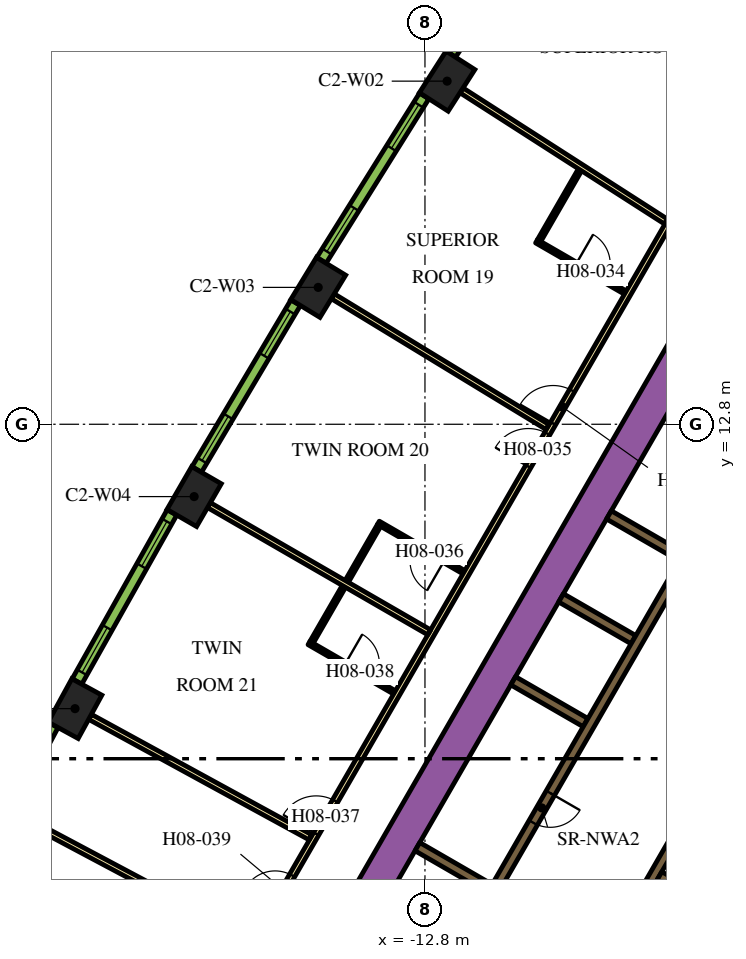
"""IFC4 building model, lengths in metres.
Left out: names, types, materials, properties, quantities, classifications, styles, units other than length and angle.
Written with IfcOpenShell. Run it as: python <this file> out.ifc"""

import sys

from ifc_helpers import new_model, si_unit, direction, frame, frame_2d, origin, origin_2d, place, context, subcontext, project, spatial, rectangle, extrude, element, fill, save


model = new_model("IFC4")
c1 = context("Model", 3, precision=1e-05, world=origin(), true_north=direction((0.0, 1.0)))
c2 = subcontext(c1, "Body", "Model", "MODEL_VIEW")
j1 = project(units=[si_unit("LENGTHUNIT", "METRE"), si_unit("PLANEANGLEUNIT", "RADIAN")], contexts=[c1])
p1 = place(None, origin())
s1 = spatial("IfcSite", under=j1, at=p1, CompositionType="ELEMENT")
p2 = place(p1, origin())
s2 = spatial("IfcBuilding", under=s1, at=p2, CompositionType="ELEMENT")
p3 = place(p2, frame((0.0, 0.0, 107.1)))
s3 = spatial("IfcBuildingStorey", under=s2, at=p3, CompositionType="ELEMENT", Elevation=107.1)
for number, where, z_axis, x_axis in (
    (1, (-12.217, 21.828, 0.0), (0.0, 0.0, 1.0), (-0.54, -0.842, 0.0)),
    (2, (-15.609, 16.402, 0.0), (0.0, 0.0, 1.0), (-0.52, -0.854, 0.0)),
    (3, (-18.874, 10.897, 0.0), (0.0, 0.0, 1.0), (-0.5, -0.866, 0.0)),
    (4, (-22.009, 5.317, 0.0), (0.0, 0.0, 1.0), (-0.48, -0.877, 0.0)),
):
    element("IfcColumn", number, at=place(p3, frame(where, z_axis=z_axis, x_axis=x_axis)), inside=s3, PredefinedType="COLUMN", context=c2, shape_type="SweptSolid", body=[
        extrude(rectangle(XDim=1.3, YDim=0.9, at=origin_2d()), origin(), (0.0, 0.0, 1.0), 3.9),
    ])
p4 = place(p3, frame((-15.36, -1.503, 0.0), z_axis=(0.0, 0.0, 1.0), x_axis=(0.50000389221, 0.866023156604, 0.0)))
e5 = element("IfcWall", 5, at=p4, inside=s3, PredefinedType="SOLIDWALL", context=c2, shape_type="SweptSolid", body=[
    extrude(rectangle(XDim=21.0, YDim=0.9, at=frame_2d((10.5, 0.0))), origin(), (0.0, 0.0, 1.0), 3.9),
])
p5 = place(p3, frame((-8.06, -1.311, 0.0), z_axis=(0.0, 0.0, 1.0), x_axis=(0.50000273126, 0.866023826885, 0.0)))
e6 = element("IfcWall", 6, at=p5, inside=s3, PredefinedType="SOLIDWALL", context=c2, shape_type="SweptSolid", body=[
    extrude(rectangle(XDim=10.33, YDim=0.25, at=frame_2d((5.165, 0.0))), origin(), (0.0, 0.0, 1.0), 3.9),
])
p6 = place(p3, frame((-4.724, -0.182, 0.0), z_axis=(0.0, 0.0, 1.0), x_axis=(-0.866008176907, 0.50002983664, 0.0)))
e7 = element("IfcWall", 7, at=p6, inside=s3, PredefinedType="SOLIDWALL", context=c2, shape_type="SweptSolid", body=[
    extrude(rectangle(XDim=2.2, YDim=0.25, at=frame_2d((1.1, 0.0))), origin(), (0.0, 0.0, 1.0), 3.9),
])
p7 = place(p3, frame((-8.106, -1.14, 0.0), z_axis=(0.0, 0.0, 1.0), x_axis=(-0.866000643155, 0.500042884217, 0.0)))
e8 = element("IfcWall", 8, at=p7, inside=s3, PredefinedType="SOLIDWALL", context=c2, shape_type="SweptSolid", body=[
    extrude(rectangle(XDim=5.65, YDim=0.25, at=frame_2d((2.825, 0.0))), origin(), (0.0, 0.0, 1.0), 3.9),
])
for number, where, z_axis, x_axis in (
    (9, (-8.574, 4.95, 0.0), (0.0, 0.0, 1.0), (-0.866, 0.5, 0.0)),
    (10, (-7.314, 7.132, 0.0), (0.0, 0.0, 1.0), (-0.866, 0.5, 0.0)),
):
    element("IfcWall", number, at=place(p3, frame(where, z_axis=z_axis, x_axis=x_axis)), inside=s3, PredefinedType="SOLIDWALL", context=c2, shape_type="SweptSolid", body=[
        extrude(rectangle(XDim=2.2, YDim=0.25, at=frame_2d((1.1, 0.0))), origin(), (0.0, 0.0, 1.0), 3.9),
    ])
p8 = place(p3, frame((-7.959, 10.415, 0.0), z_axis=(0.0, 0.0, 1.0), x_axis=(0.866020958405, -0.500007699544, 0.0)))
e11 = element("IfcWall", 11, at=p8, inside=s3, PredefinedType="SOLIDWALL", context=c2, shape_type="SweptSolid", body=[
    extrude(rectangle(XDim=4.1, YDim=0.25, at=frame_2d((2.05, 0.0))), origin(), (0.0, 0.0, 1.0), 3.9),
])
p9 = place(p3, frame((-6.008, 9.144, 0.0), z_axis=(0.0, 0.0, 1.0), x_axis=(-0.500006956611, -0.866021387346, 0.0)))
e12 = element("IfcWall", 12, at=p9, inside=s3, PredefinedType="SOLIDWALL", context=c2, shape_type="SweptSolid", body=[
    extrude(rectangle(XDim=9.83, YDim=0.25, at=frame_2d((4.915, 0.0))), origin(), (0.0, 0.0, 1.0), 3.9),
])
p10 = place(p9, frame((6.985, 0.0, 0.0)))
e13 = element("IfcOpeningElement", 13, at=p10, cuts=e12, PredefinedType="OPENING", context=c2, shape_type="SweptSolid", body=[
    extrude(rectangle(XDim=0.9, YDim=2.1, at=frame_2d((0.45, 1.05))), frame((0.0, 0.135, 0.0), z_axis=(0.0, -1.0, 0.0), x_axis=(1.0, 0.0, 0.0)), (0.0, 0.0, 1.0), 0.27),
])
p11 = place(p3, frame((-19.081, -3.9, 0.0), z_axis=(0.0, 0.0, 1.0), x_axis=(0.499998313975, 0.866026377209, 0.0)))
e14 = element("IfcWall", 14, at=p11, inside=s3, PredefinedType="PARTITIONING", context=c2, shape_type="SweptSolid", body=[
    extrude(rectangle(XDim=25.766, YDim=0.15, at=frame_2d((12.883, 0.0))), origin(), (0.0, 0.0, 1.0), 2.75),
])
p12 = place(p11, frame((19.306, 0.0, 0.0)))
e15 = element("IfcOpeningElement", 15, at=p12, cuts=e14, PredefinedType="OPENING", context=c2, shape_type="SweptSolid", body=[
    extrude(rectangle(XDim=1.0, YDim=2.1, at=frame_2d((0.5, 1.05))), frame((0.0, 0.085, 0.0), z_axis=(0.0, -1.0, 0.0), x_axis=(1.0, 0.0, 0.0)), (0.0, 0.0, 1.0), 0.17),
])
p13 = place(p11, frame((18.0, 0.0, 0.0)))
e16 = element("IfcOpeningElement", 16, at=p13, cuts=e14, PredefinedType="OPENING", context=c2, shape_type="SweptSolid", body=[
    extrude(rectangle(XDim=1.0, YDim=2.1, at=frame_2d((0.5, 1.05))), frame((0.0, 0.085, 0.0), z_axis=(0.0, -1.0, 0.0), x_axis=(1.0, 0.0, 0.0)), (0.0, 0.0, 1.0), 0.17),
])
p14 = place(p11, frame((6.838, 0.0, 0.0)))
e17 = element("IfcOpeningElement", 17, at=p14, cuts=e14, PredefinedType="OPENING", context=c2, shape_type="SweptSolid", body=[
    extrude(rectangle(XDim=1.0, YDim=2.1, at=frame_2d((0.5, 1.05))), frame((0.0, 0.085, 0.0), z_axis=(0.0, -1.0, 0.0), x_axis=(1.0, 0.0, 0.0)), (0.0, 0.0, 1.0), 0.17),
])
p15 = place(p11, frame((4.674, 0.0, 0.0)))
e18 = element("IfcOpeningElement", 18, at=p15, cuts=e14, PredefinedType="OPENING", context=c2, shape_type="SweptSolid", body=[
    extrude(rectangle(XDim=0.9, YDim=2.1, at=frame_2d((0.45, 1.05))), frame((0.0, 0.085, 0.0), z_axis=(0.0, -1.0, 0.0), x_axis=(1.0, 0.0, 0.0)), (0.0, 0.0, 1.0), 0.17),
])
p16 = place(p11, frame((0.18, 0.0, 0.0)))
e19 = element("IfcOpeningElement", 19, at=p16, cuts=e14, PredefinedType="OPENING", context=c2, shape_type="SweptSolid", body=[
    extrude(rectangle(XDim=1.0, YDim=2.1, at=frame_2d((0.5, 1.05))), frame((0.0, 0.085, 0.0), z_axis=(0.0, -1.0, 0.0), x_axis=(1.0, 0.0, 0.0)), (0.0, 0.0, 1.0), 0.17),
])
p17 = place(p3, frame((-23.652, 2.567, 0.0), z_axis=(0.0, 0.0, 1.0), x_axis=(0.883019237957, -0.469336793144, 0.0)))
e20 = element("IfcWall", 20, at=p17, inside=s3, PredefinedType="PARTITIONING", context=c2, shape_type="SweptSolid", body=[
    extrude(rectangle(XDim=7.111, YDim=0.15, at=frame_2d((3.555, 0.0))), origin(), (0.0, 0.0, 1.0), 2.75),
])
p18 = place(p3, frame((-21.614, 5.102, 0.0), z_axis=(0.0, 0.0, 1.0), x_axis=(0.877484555087, -0.479604895287, 0.0)))
e21 = element("IfcWall", 21, at=p18, inside=s3, PredefinedType="PARTITIONING", context=c2, shape_type="SweptSolid", body=[
    extrude(rectangle(XDim=6.611, YDim=0.15, at=frame_2d((3.306, 0.0))), origin(), (0.0, 0.0, 1.0), 2.75),
])
p19 = place(p3, frame((-18.484, 10.672, 0.0), z_axis=(0.0, 0.0, 1.0), x_axis=(0.866019162053, -0.50001081084, 0.0)))
e22 = element("IfcWall", 22, at=p19, inside=s3, PredefinedType="PARTITIONING", context=c2, shape_type="SweptSolid", body=[
    extrude(rectangle(XDim=6.694, YDim=0.15, at=frame_2d((3.347, 0.0))), origin(), (0.0, 0.0, 1.0), 2.75),
])
p20 = place(p3, frame((-15.225, 16.167, 0.0), z_axis=(0.0, 0.0, 1.0), x_axis=(0.854088713274, -0.520127359266, 0.0)))
e23 = element("IfcWall", 23, at=p20, inside=s3, PredefinedType="PARTITIONING", context=c2, shape_type="SweptSolid", body=[
    extrude(rectangle(XDim=6.611, YDim=0.15, at=frame_2d((3.305, 0.0))), origin(), (0.0, 0.0, 1.0), 2.75),
])
p21 = place(p3, frame((-11.838, 21.585, 0.0), z_axis=(0.0, 0.0, 1.0), x_axis=(0.841699322813, -0.539946525108, 0.0)))
e24 = element("IfcWall", 24, at=p21, inside=s3, PredefinedType="PARTITIONING", context=c2, shape_type="SweptSolid", body=[
    extrude(rectangle(XDim=6.392, YDim=0.15, at=frame_2d((3.196, 0.0))), origin(), (0.0, 0.0, 1.0), 2.75),
])
p22 = place(p3, frame((-8.326, 26.923, 0.0), z_axis=(0.0, 0.0, 1.0), x_axis=(0.828836601893, -0.5594907393, 0.0)))
e25 = element("IfcWall", 25, at=p22, inside=s3, PredefinedType="PARTITIONING", context=c2, shape_type="SweptSolid", body=[
    extrude(rectangle(XDim=8.909, YDim=0.15, at=frame_2d((4.455, 0.0))), origin(), (0.0, 0.0, 1.0), 2.75),
])
p23 = place(p3, frame((-9.864, 17.615, 0.0), z_axis=(0.0, 0.0, 1.0), x_axis=(0.866019956843, -0.50000943426, 0.0)))
e26 = element("IfcWall", 26, at=p23, inside=s3, PredefinedType="PARTITIONING", context=c2, shape_type="SweptSolid", body=[
    extrude(rectangle(XDim=2.7, YDim=0.1, at=frame_2d((1.35, 0.0))), origin(), (0.0, 0.0, 1.0), 2.75),
])
p24 = place(p23, frame((1.2, 0.0, 0.0)))
e27 = element("IfcOpeningElement", 27, at=p24, cuts=e26, PredefinedType="OPENING", context=c2, shape_type="SweptSolid", body=[
    extrude(rectangle(XDim=0.9, YDim=2.1, at=frame_2d((0.45, 1.05))), frame((0.0, 0.06, 0.0), z_axis=(0.0, -1.0, 0.0), x_axis=(1.0, 0.0, 0.0)), (0.0, 0.0, 1.0), 0.12),
])
p25 = place(p3, frame((-9.796, 17.633, 0.0), z_axis=(0.0, 0.0, 1.0), x_axis=(0.499961633463, 0.866047553582, 0.0)))
e28 = element("IfcWall", 28, at=p25, inside=s3, PredefinedType="PARTITIONING", context=c2, shape_type="SweptSolid", body=[
    extrude(rectangle(XDim=2.15, YDim=0.1, at=frame_2d((1.075, 0.0))), origin(), (0.0, 0.0, 1.0), 2.75),
])
p26 = place(p3, frame((-11.774, 8.906, 0.0), z_axis=(0.0, 0.0, 1.0), x_axis=(-0.865997922154, 0.500047596559, 0.0)))
e29 = element("IfcWall", 29, at=p26, inside=s3, PredefinedType="PARTITIONING", context=c2, shape_type="SweptSolid", body=[
    extrude(rectangle(XDim=2.6, YDim=0.1, at=frame_2d((1.3, 0.0))), origin(), (0.0, 0.0, 1.0), 2.75),
])
p27 = place(p26, frame((0.6, 0.0, 0.0)))
e30 = element("IfcOpeningElement", 30, at=p27, cuts=e29, PredefinedType="OPENING", context=c2, shape_type="SweptSolid", body=[
    extrude(rectangle(XDim=0.9, YDim=2.1, at=frame_2d((0.45, 1.05))), frame((0.0, 0.06, 0.0), z_axis=(0.0, -1.0, 0.0), x_axis=(1.0, 0.0, 0.0)), (0.0, 0.0, 1.0), 0.12),
])
p28 = place(p3, frame((-14.008, 10.138, 0.0), z_axis=(0.0, 0.0, 1.0), x_axis=(-0.499892348375, -0.866087547558, 0.0)))
e31 = element("IfcWall", 31, at=p28, inside=s3, PredefinedType="PARTITIONING", context=c2, shape_type="SweptSolid", body=[
    extrude(rectangle(XDim=1.7, YDim=0.1, at=frame_2d((0.85, 0.0))), origin(), (0.0, 0.0, 1.0), 2.75),
])
p29 = place(p3, frame((-15.852, 7.044, 0.0), z_axis=(0.0, 0.0, 1.0), x_axis=(0.866021400173, -0.500006934395, 0.0)))
e32 = element("IfcWall", 32, at=p29, inside=s3, PredefinedType="PARTITIONING", context=c2, shape_type="SweptSolid", body=[
    extrude(rectangle(XDim=2.6, YDim=0.1, at=frame_2d((1.3, 0.0))), origin(), (0.0, 0.0, 1.0), 2.75),
])
p30 = place(p29, frame((1.1, 0.0, 0.0)))
e33 = element("IfcOpeningElement", 33, at=p30, cuts=e32, PredefinedType="OPENING", context=c2, shape_type="SweptSolid", body=[
    extrude(rectangle(XDim=0.9, YDim=2.1, at=frame_2d((0.45, 1.05))), frame((0.0, 0.06, 0.0), z_axis=(0.0, -1.0, 0.0), x_axis=(1.0, 0.0, 0.0)), (0.0, 0.0, 1.0), 0.12),
])
p31 = place(p3, frame((-15.783, 7.062, 0.0), z_axis=(0.0, 0.0, 1.0), x_axis=(0.499954529098, 0.86605165483, 0.0)))
e34 = element("IfcWall", 34, at=p31, inside=s3, PredefinedType="PARTITIONING", context=c2, shape_type="SweptSolid", body=[
    extrude(rectangle(XDim=1.7, YDim=0.1, at=frame_2d((0.85, 0.0))), origin(), (0.0, 0.0, 1.0), 2.75),
])
p32 = place(p3, frame((-9.311, 26.799, 0.0), z_axis=(0.0, 0.0, 1.0), x_axis=(-0.549741341923, -0.835334937005, 0.0)))
e35 = element("IfcWall", 35, at=p32, inside=s3, PredefinedType="SOLIDWALL", context=c2, shape_type="SweptSolid", body=[
    extrude(rectangle(XDim=5.1, YDim=0.29, at=frame_2d((2.55, 0.0))), origin(), (0.0, 0.0, 1.0), 3.65),
])
p33 = place(p32, frame((0.273, 0.0, 0.9)))
e36 = element("IfcOpeningElement", 36, at=p33, cuts=e35, PredefinedType="OPENING", context=c2, shape_type="SweptSolid", body=[
    extrude(rectangle(XDim=1.35, YDim=2.15, at=frame_2d((0.675, 1.075))), frame((0.0, 0.155, 0.0), z_axis=(0.0, -1.0, 0.0), x_axis=(1.0, 0.0, 0.0)), (0.0, 0.0, 1.0), 0.31),
])
p34 = place(p32, frame((3.478, 0.0, 0.9)))
e37 = element("IfcOpeningElement", 37, at=p34, cuts=e35, PredefinedType="OPENING", context=c2, shape_type="SweptSolid", body=[
    extrude(rectangle(XDim=1.35, YDim=2.15, at=frame_2d((0.675, 1.075))), frame((0.0, 0.155, 0.0), z_axis=(0.0, -1.0, 0.0), x_axis=(1.0, 0.0, 0.0)), (0.0, 0.0, 1.0), 0.31),
])
p35 = place(p3, frame((-12.82, 21.439, 0.0), z_axis=(0.0, 0.0, 1.0), x_axis=(-0.530072082134, -0.847952585787, 0.0)))
e38 = element("IfcWall", 38, at=p35, inside=s3, PredefinedType="SOLIDWALL", context=c2, shape_type="SweptSolid", body=[
    extrude(rectangle(XDim=5.1, YDim=0.29, at=frame_2d((2.55, 0.0))), origin(), (0.0, 0.0, 1.0), 3.65),
])
p36 = place(p35, frame((0.273, 0.0, 0.9)))
e39 = element("IfcOpeningElement", 39, at=p36, cuts=e38, PredefinedType="OPENING", context=c2, shape_type="SweptSolid", body=[
    extrude(rectangle(XDim=1.35, YDim=2.15, at=frame_2d((0.675, 1.075))), frame((0.0, 0.155, 0.0), z_axis=(0.0, -1.0, 0.0), x_axis=(1.0, 0.0, 0.0)), (0.0, 0.0, 1.0), 0.31),
])
p37 = place(p35, frame((3.478, 0.0, 0.9)))
e40 = element("IfcOpeningElement", 40, at=p37, cuts=e38, PredefinedType="OPENING", context=c2, shape_type="SweptSolid", body=[
    extrude(rectangle(XDim=1.35, YDim=2.15, at=frame_2d((0.675, 1.075))), frame((0.0, 0.155, 0.0), z_axis=(0.0, -1.0, 0.0), x_axis=(1.0, 0.0, 0.0)), (0.0, 0.0, 1.0), 0.31),
])
p38 = place(p3, frame((-16.203, 15.998, 0.0), z_axis=(0.0, 0.0, 1.0), x_axis=(-0.510054281659, -0.860142214847, 0.0)))
e41 = element("IfcWall", 41, at=p38, inside=s3, PredefinedType="SOLIDWALL", context=c2, shape_type="SweptSolid", body=[
    extrude(rectangle(XDim=5.101, YDim=0.29, at=frame_2d((2.55, 0.0))), origin(), (0.0, 0.0, 1.0), 3.65),
])
p39 = place(p38, frame((0.273, 0.0, 0.9)))
e42 = element("IfcOpeningElement", 42, at=p39, cuts=e41, PredefinedType="OPENING", context=c2, shape_type="SweptSolid", body=[
    extrude(rectangle(XDim=1.35, YDim=2.15, at=frame_2d((0.675, 1.075))), frame((0.0, 0.155, 0.0), z_axis=(0.0, -1.0, 0.0), x_axis=(1.0, 0.0, 0.0)), (0.0, 0.0, 1.0), 0.31),
])
p40 = place(p38, frame((3.478, 0.0, 0.9)))
e43 = element("IfcOpeningElement", 43, at=p40, cuts=e41, PredefinedType="OPENING", context=c2, shape_type="SweptSolid", body=[
    extrude(rectangle(XDim=1.35, YDim=2.15, at=frame_2d((0.675, 1.075))), frame((0.0, 0.155, 0.0), z_axis=(0.0, -1.0, 0.0), x_axis=(1.0, 0.0, 0.0)), (0.0, 0.0, 1.0), 0.31),
])
p41 = place(p3, frame((-19.458, 10.48, 0.0), z_axis=(0.0, 0.0, 1.0), x_axis=(-0.48983164787, -0.87181704316, 0.0)))
e44 = element("IfcWall", 44, at=p41, inside=s3, PredefinedType="SOLIDWALL", context=c2, shape_type="SweptSolid", body=[
    extrude(rectangle(XDim=5.1, YDim=0.29, at=frame_2d((2.55, 0.0))), origin(), (0.0, 0.0, 1.0), 3.65),
])
p42 = place(p41, frame((0.272, 0.0, 0.9)))
e45 = element("IfcOpeningElement", 45, at=p42, cuts=e44, PredefinedType="OPENING", context=c2, shape_type="SweptSolid", body=[
    extrude(rectangle(XDim=1.35, YDim=2.15, at=frame_2d((0.675, 1.075))), frame((0.0, 0.155, 0.0), z_axis=(0.0, -1.0, 0.0), x_axis=(1.0, 0.0, 0.0)), (0.0, 0.0, 1.0), 0.31),
])
p43 = place(p41, frame((3.478, 0.0, 0.9)))
e46 = element("IfcOpeningElement", 46, at=p43, cuts=e44, PredefinedType="OPENING", context=c2, shape_type="SweptSolid", body=[
    extrude(rectangle(XDim=1.35, YDim=2.15, at=frame_2d((0.675, 1.075))), frame((0.0, 0.155, 0.0), z_axis=(0.0, -1.0, 0.0), x_axis=(1.0, 0.0, 0.0)), (0.0, 0.0, 1.0), 0.31),
])
p44 = place(p3, frame((-22.583, 4.887, 0.0), z_axis=(0.0, 0.0, 1.0), x_axis=(-0.469323203119, -0.883026461106, 0.0)))
e47 = element("IfcWall", 47, at=p44, inside=s3, PredefinedType="SOLIDWALL", context=c2, shape_type="SweptSolid", body=[
    extrude(rectangle(XDim=5.101, YDim=0.29, at=frame_2d((2.55, 0.0))), origin(), (0.0, 0.0, 1.0), 3.65),
])
p45 = place(p44, frame((0.273, 0.0, 0.9)))
e48 = element("IfcOpeningElement", 48, at=p45, cuts=e47, PredefinedType="OPENING", context=c2, shape_type="SweptSolid", body=[
    extrude(rectangle(XDim=1.35, YDim=2.15, at=frame_2d((0.675, 1.075))), frame((0.0, 0.155, 0.0), z_axis=(0.0, -1.0, 0.0), x_axis=(1.0, 0.0, 0.0)), (0.0, 0.0, 1.0), 0.31),
])
p46 = place(p44, frame((3.478, 0.0, 0.9)))
e49 = element("IfcOpeningElement", 49, at=p46, cuts=e47, PredefinedType="OPENING", context=c2, shape_type="SweptSolid", body=[
    extrude(rectangle(XDim=1.35, YDim=2.15, at=frame_2d((0.675, 1.075))), frame((0.0, 0.155, 0.0), z_axis=(0.0, -1.0, 0.0), x_axis=(1.0, 0.0, 0.0)), (0.0, 0.0, 1.0), 0.31),
])
p47 = place(p10, origin())
e50 = element("IfcDoor", 50, at=p47, inside=s3, OperationType="SINGLE_SWING_LEFT", PredefinedType="DOOR", context=c2, shape_type="SweptSolid", body=[
    extrude(rectangle(XDim=0.9, YDim=2.1, at=frame_2d((0.45, 1.05))), frame((0.0, 0.025, 0.0), z_axis=(0.0, -1.0, 0.0), x_axis=(1.0, 0.0, 0.0)), (0.0, 0.0, 1.0), 0.05),
])
fill(e13, e50)
p48 = place(p12, origin())
e51 = element("IfcDoor", 51, at=p48, inside=s3, OperationType="SINGLE_SWING_LEFT", PredefinedType="DOOR", context=c2, shape_type="SweptSolid", body=[
    extrude(rectangle(XDim=1.0, YDim=2.1, at=frame_2d((0.5, 1.05))), frame((0.0, 0.025, 0.0), z_axis=(0.0, -1.0, 0.0), x_axis=(1.0, 0.0, 0.0)), (0.0, 0.0, 1.0), 0.05),
])
fill(e15, e51)
p49 = place(p24, origin())
e52 = element("IfcDoor", 52, at=p49, inside=s3, OperationType="SINGLE_SWING_LEFT", PredefinedType="DOOR", context=c2, shape_type="SweptSolid", body=[
    extrude(rectangle(XDim=0.9, YDim=2.1, at=frame_2d((0.45, 1.05))), frame((0.0, 0.025, 0.0), z_axis=(0.0, -1.0, 0.0), x_axis=(1.0, 0.0, 0.0)), (0.0, 0.0, 1.0), 0.05),
])
fill(e27, e52)
p50 = place(p13, origin())
e53 = element("IfcDoor", 53, at=p50, inside=s3, OperationType="SINGLE_SWING_RIGHT", PredefinedType="DOOR", context=c2, shape_type="SweptSolid", body=[
    extrude(rectangle(XDim=1.0, YDim=2.1, at=frame_2d((0.5, 1.05))), frame((0.0, 0.025, 0.0), z_axis=(0.0, -1.0, 0.0), x_axis=(1.0, 0.0, 0.0)), (0.0, 0.0, 1.0), 0.05),
])
fill(e16, e53)
p51 = place(p27, origin())
e54 = element("IfcDoor", 54, at=p51, inside=s3, OperationType="SINGLE_SWING_LEFT", PredefinedType="DOOR", context=c2, shape_type="SweptSolid", body=[
    extrude(rectangle(XDim=0.9, YDim=2.1, at=frame_2d((0.45, 1.05))), frame((0.0, 0.025, 0.0), z_axis=(0.0, -1.0, 0.0), x_axis=(1.0, 0.0, 0.0)), (0.0, 0.0, 1.0), 0.05),
])
fill(e30, e54)
p52 = place(p14, origin())
e55 = element("IfcDoor", 55, at=p52, inside=s3, OperationType="SINGLE_SWING_LEFT", PredefinedType="DOOR", context=c2, shape_type="SweptSolid", body=[
    extrude(rectangle(XDim=1.0, YDim=2.1, at=frame_2d((0.5, 1.05))), frame((0.0, 0.025, 0.0), z_axis=(0.0, -1.0, 0.0), x_axis=(1.0, 0.0, 0.0)), (0.0, 0.0, 1.0), 0.05),
])
fill(e17, e55)
p53 = place(p30, origin())
e56 = element("IfcDoor", 56, at=p53, inside=s3, OperationType="SINGLE_SWING_RIGHT", PredefinedType="DOOR", context=c2, shape_type="SweptSolid", body=[
    extrude(rectangle(XDim=0.9, YDim=2.1, at=frame_2d((0.45, 1.05))), frame((0.0, 0.025, 0.0), z_axis=(0.0, -1.0, 0.0), x_axis=(1.0, 0.0, 0.0)), (0.0, 0.0, 1.0), 0.05),
])
fill(e33, e56)
p54 = place(p15, origin())
e57 = element("IfcDoor", 57, at=p54, inside=s3, OperationType="SINGLE_SWING_RIGHT", PredefinedType="DOOR", context=c2, shape_type="SweptSolid", body=[
    extrude(rectangle(XDim=0.9, YDim=2.1, at=frame_2d((0.45, 1.05))), frame((0.0, 0.025, 0.0), z_axis=(0.0, -1.0, 0.0), x_axis=(1.0, 0.0, 0.0)), (0.0, 0.0, 1.0), 0.05),
])
fill(e18, e57)
p55 = place(p36, origin())
e58 = element("IfcWindow", 58, at=p55, inside=s3, PartitioningType="DOUBLE_PANEL_VERTICAL", PredefinedType="WINDOW", context=c2, shape_type="SweptSolid", body=[
    extrude(rectangle(XDim=1.35, YDim=2.15, at=frame_2d((0.675, 1.075))), frame((0.0, 0.015, 0.0), z_axis=(0.0, -1.0, 0.0), x_axis=(1.0, 0.0, 0.0)), (0.0, 0.0, 1.0), 0.06),
])
fill(e39, e58)
p56 = place(p37, origin())
e59 = element("IfcWindow", 59, at=p56, inside=s3, PartitioningType="DOUBLE_PANEL_VERTICAL", PredefinedType="WINDOW", context=c2, shape_type="SweptSolid", body=[
    extrude(rectangle(XDim=1.35, YDim=2.15, at=frame_2d((0.675, 1.075))), frame((0.0, 0.015, 0.0), z_axis=(0.0, -1.0, 0.0), x_axis=(1.0, 0.0, 0.0)), (0.0, 0.0, 1.0), 0.06),
])
fill(e40, e59)
p57 = place(p39, origin())
e60 = element("IfcWindow", 60, at=p57, inside=s3, PartitioningType="DOUBLE_PANEL_VERTICAL", PredefinedType="WINDOW", context=c2, shape_type="SweptSolid", body=[
    extrude(rectangle(XDim=1.35, YDim=2.15, at=frame_2d((0.675, 1.075))), frame((0.0, 0.015, 0.0), z_axis=(0.0, -1.0, 0.0), x_axis=(1.0, 0.0, 0.0)), (0.0, 0.0, 1.0), 0.06),
])
fill(e42, e60)
p58 = place(p40, origin())
e61 = element("IfcWindow", 61, at=p58, inside=s3, PartitioningType="DOUBLE_PANEL_VERTICAL", PredefinedType="WINDOW", context=c2, shape_type="SweptSolid", body=[
    extrude(rectangle(XDim=1.35, YDim=2.15, at=frame_2d((0.675, 1.075))), frame((0.0, 0.015, 0.0), z_axis=(0.0, -1.0, 0.0), x_axis=(1.0, 0.0, 0.0)), (0.0, 0.0, 1.0), 0.06),
])
fill(e43, e61)
p59 = place(p42, origin())
e62 = element("IfcWindow", 62, at=p59, inside=s3, PartitioningType="DOUBLE_PANEL_VERTICAL", PredefinedType="WINDOW", context=c2, shape_type="SweptSolid", body=[
    extrude(rectangle(XDim=1.35, YDim=2.15, at=frame_2d((0.675, 1.075))), frame((0.0, 0.015, 0.0), z_axis=(0.0, -1.0, 0.0), x_axis=(1.0, 0.0, 0.0)), (0.0, 0.0, 1.0), 0.06),
])
fill(e45, e62)
p60 = place(p43, origin())
e63 = element("IfcWindow", 63, at=p60, inside=s3, PartitioningType="DOUBLE_PANEL_VERTICAL", PredefinedType="WINDOW", context=c2, shape_type="SweptSolid", body=[
    extrude(rectangle(XDim=1.35, YDim=2.15, at=frame_2d((0.675, 1.075))), frame((0.0, 0.015, 0.0), z_axis=(0.0, -1.0, 0.0), x_axis=(1.0, 0.0, 0.0)), (0.0, 0.0, 1.0), 0.06),
])
fill(e46, e63)
save(model, sys.argv[1])
